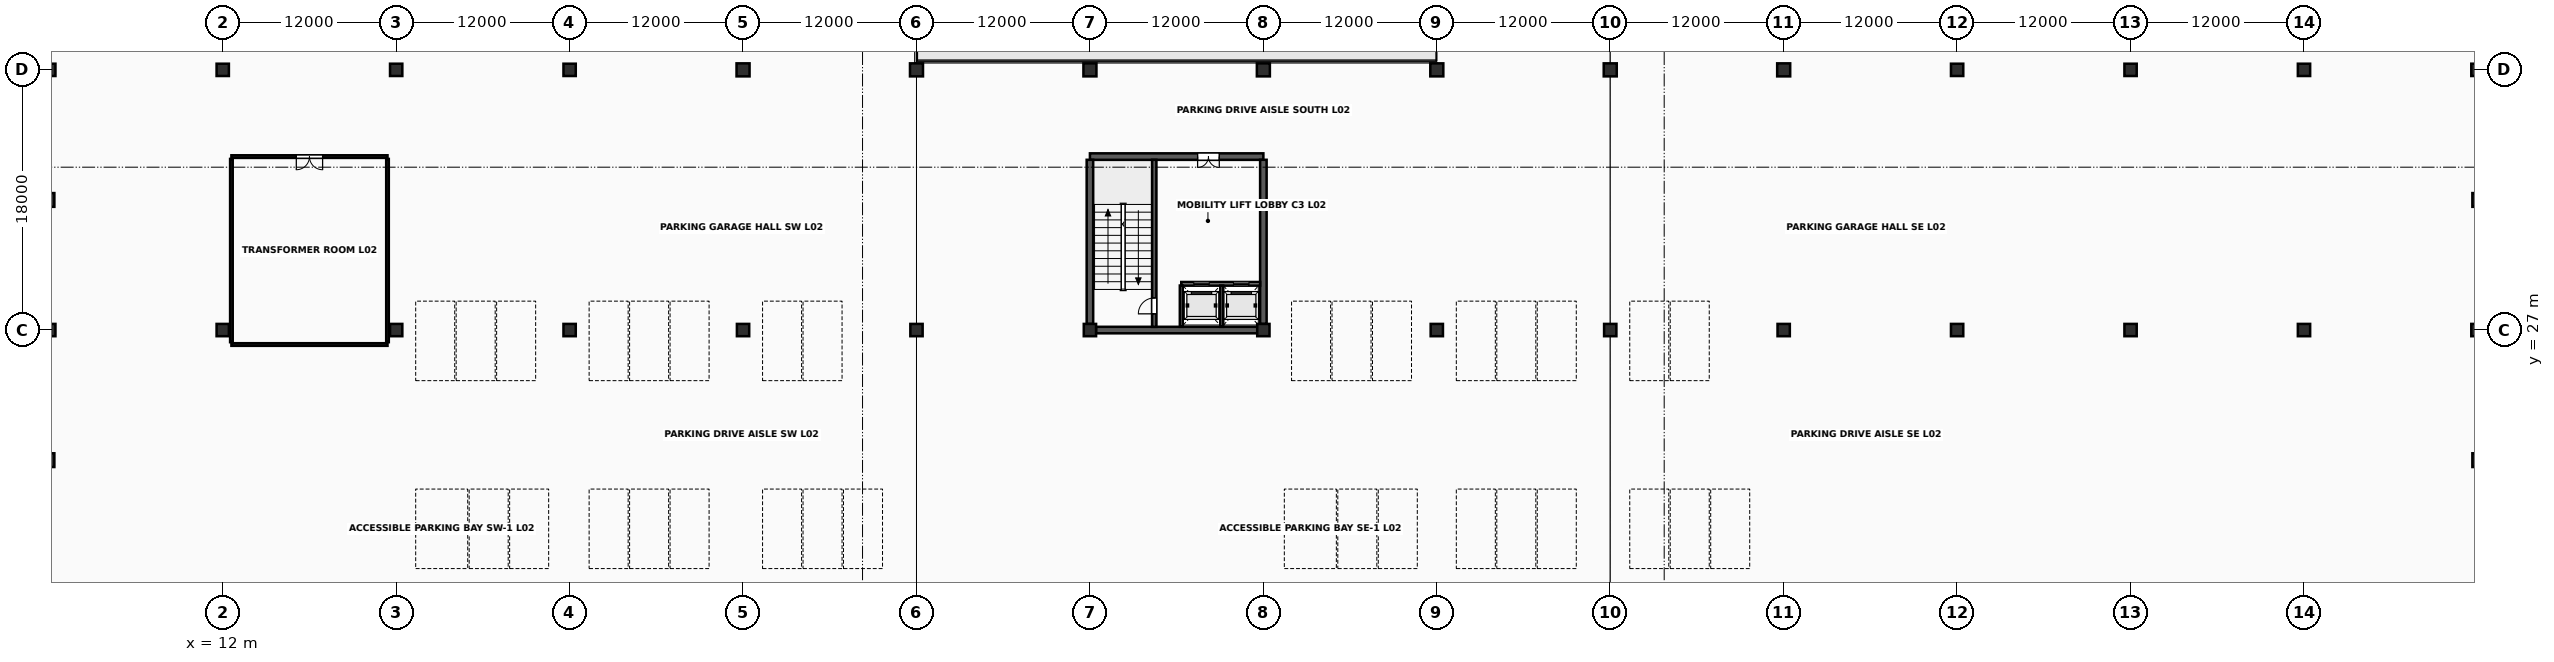
"""IFC4 building model, lengths in metres.
Left out: names, types, materials, properties, quantities, classifications, styles, units other than length and angle.
Written with IfcOpenShell. Run it as: python <this file> out.ifc"""

import sys

from ifc_helpers import new_model, si_unit, direction, frame, frame_2d, origin, origin_2d, place, context, subcontext, project, spatial, rectangle, extrude, element, fill, save


model = new_model("IFC4")
c1 = context("Model", 3, precision=1e-05, world=origin(), true_north=direction((0.0, 1.0)))
c2 = subcontext(c1, "Body", "Model", "MODEL_VIEW")
j1 = project(units=[si_unit("LENGTHUNIT", "METRE"), si_unit("PLANEANGLEUNIT", "RADIAN")], contexts=[c1])
p1 = place(None, origin())
s1 = spatial("IfcSite", under=j1, at=p1, CompositionType="ELEMENT")
p2 = place(p1, origin())
s2 = spatial("IfcBuilding", under=s1, at=p2, CompositionType="ELEMENT")
p3 = place(p2, frame((0.0, 0.0, 9.6)))
s3 = spatial("IfcBuildingStorey", under=s2, at=p3, CompositionType="ELEMENT", Elevation=9.6)
for number, where, z_axis, x_axis in (
    (1, (0.0, 27.0, 0.0), (0.0, 0.0, 1.0), (1.0, 0.0, 0.0)),
    (2, (0.0, 45.0, 0.0), (0.0, 0.0, 1.0), (1.0, 0.0, 0.0)),
    (3, (12.0, 27.0, 0.0), (0.0, 0.0, 1.0), (1.0, 0.0, 0.0)),
    (4, (12.0, 45.0, 0.0), (0.0, 0.0, 1.0), (1.0, 0.0, 0.0)),
    (5, (24.0, 27.0, 0.0), (0.0, 0.0, 1.0), (1.0, 0.0, 0.0)),
    (6, (24.0, 45.0, 0.0), (0.0, 0.0, 1.0), (1.0, 0.0, 0.0)),
    (7, (36.0, 27.0, 0.0), (0.0, 0.0, 1.0), (1.0, 0.0, 0.0)),
    (8, (36.0, 45.0, 0.0), (0.0, 0.0, 1.0), (1.0, 0.0, 0.0)),
    (9, (48.0, 27.0, 0.0), (0.0, 0.0, 1.0), (1.0, 0.0, 0.0)),
):
    element("IfcColumn", number, at=place(p3, frame(where, z_axis=z_axis, x_axis=x_axis)), inside=s3, PredefinedType="COLUMN", context=c2, shape_type="SweptSolid", body=[
        extrude(rectangle(XDim=0.85, YDim=0.85, at=origin_2d()), origin(), (0.0, 0.0, 1.0), 3.8),
    ])
p4 = place(p3, frame((48.0, 45.0, 0.0), z_axis=(0.0, 0.0, 1.0), x_axis=(1.0, 0.0, 0.0)))
e10 = element("IfcColumn", 10, at=p4, inside=s3, PredefinedType="COLUMN", context=c2, shape_type="SweptSolid", body=[
    extrude(rectangle(XDim=0.9, YDim=0.9, at=origin_2d()), origin(), (0.0, 0.0, 1.0), 3.8),
])
p5 = place(p3, frame((60.0, 27.0, 0.0), z_axis=(0.0, 0.0, 1.0), x_axis=(1.0, 0.0, 0.0)))
e11 = element("IfcColumn", 11, at=p5, inside=s3, PredefinedType="COLUMN", context=c2, shape_type="SweptSolid", body=[
    extrude(rectangle(XDim=0.85, YDim=0.85, at=origin_2d()), origin(), (0.0, 0.0, 1.0), 3.8),
])
p6 = place(p3, frame((60.0, 45.0, 0.0), z_axis=(0.0, 0.0, 1.0), x_axis=(1.0, 0.0, 0.0)))
e12 = element("IfcColumn", 12, at=p6, inside=s3, PredefinedType="COLUMN", context=c2, shape_type="SweptSolid", body=[
    extrude(rectangle(XDim=0.9, YDim=0.9, at=origin_2d()), origin(), (0.0, 0.0, 1.0), 3.8),
])
p7 = place(p3, frame((72.0, 27.0, 0.0), z_axis=(0.0, 0.0, 1.0), x_axis=(1.0, 0.0, 0.0)))
e13 = element("IfcColumn", 13, at=p7, inside=s3, PredefinedType="COLUMN", context=c2, shape_type="SweptSolid", body=[
    extrude(rectangle(XDim=0.85, YDim=0.85, at=origin_2d()), origin(), (0.0, 0.0, 1.0), 3.8),
])
p8 = place(p3, frame((72.0, 45.0, 0.0), z_axis=(0.0, 0.0, 1.0), x_axis=(1.0, 0.0, 0.0)))
e14 = element("IfcColumn", 14, at=p8, inside=s3, PredefinedType="COLUMN", context=c2, shape_type="SweptSolid", body=[
    extrude(rectangle(XDim=0.9, YDim=0.9, at=origin_2d()), origin(), (0.0, 0.0, 1.0), 3.8),
])
p9 = place(p3, frame((84.0, 27.0, 0.0), z_axis=(0.0, 0.0, 1.0), x_axis=(1.0, 0.0, 0.0)))
e15 = element("IfcColumn", 15, at=p9, inside=s3, PredefinedType="COLUMN", context=c2, shape_type="SweptSolid", body=[
    extrude(rectangle(XDim=0.85, YDim=0.85, at=origin_2d()), origin(), (0.0, 0.0, 1.0), 3.8),
])
p10 = place(p3, frame((84.0, 45.0, 0.0), z_axis=(0.0, 0.0, 1.0), x_axis=(1.0, 0.0, 0.0)))
e16 = element("IfcColumn", 16, at=p10, inside=s3, PredefinedType="COLUMN", context=c2, shape_type="SweptSolid", body=[
    extrude(rectangle(XDim=0.9, YDim=0.9, at=origin_2d()), origin(), (0.0, 0.0, 1.0), 3.8),
])
p11 = place(p3, frame((96.0, 27.0, 0.0), z_axis=(0.0, 0.0, 1.0), x_axis=(1.0, 0.0, 0.0)))
e17 = element("IfcColumn", 17, at=p11, inside=s3, PredefinedType="COLUMN", context=c2, shape_type="SweptSolid", body=[
    extrude(rectangle(XDim=0.85, YDim=0.85, at=origin_2d()), origin(), (0.0, 0.0, 1.0), 3.8),
])
p12 = place(p3, frame((96.0, 45.0, 0.0), z_axis=(0.0, 0.0, 1.0), x_axis=(1.0, 0.0, 0.0)))
e18 = element("IfcColumn", 18, at=p12, inside=s3, PredefinedType="COLUMN", context=c2, shape_type="SweptSolid", body=[
    extrude(rectangle(XDim=0.9, YDim=0.9, at=origin_2d()), origin(), (0.0, 0.0, 1.0), 3.8),
])
p13 = place(p3, frame((108.0, 27.0, 0.0), z_axis=(0.0, 0.0, 1.0), x_axis=(1.0, 0.0, 0.0)))
e19 = element("IfcColumn", 19, at=p13, inside=s3, PredefinedType="COLUMN", context=c2, shape_type="SweptSolid", body=[
    extrude(rectangle(XDim=0.85, YDim=0.85, at=origin_2d()), origin(), (0.0, 0.0, 1.0), 3.8),
])
p14 = place(p3, frame((108.0, 45.0, 0.0), z_axis=(0.0, 0.0, 1.0), x_axis=(1.0, 0.0, 0.0)))
e20 = element("IfcColumn", 20, at=p14, inside=s3, PredefinedType="COLUMN", context=c2, shape_type="SweptSolid", body=[
    extrude(rectangle(XDim=0.9, YDim=0.9, at=origin_2d()), origin(), (0.0, 0.0, 1.0), 3.8),
])
p15 = place(p3, frame((120.0, 27.0, 0.0), z_axis=(0.0, 0.0, 1.0), x_axis=(1.0, 0.0, 0.0)))
e21 = element("IfcColumn", 21, at=p15, inside=s3, PredefinedType="COLUMN", context=c2, shape_type="SweptSolid", body=[
    extrude(rectangle(XDim=0.85, YDim=0.85, at=origin_2d()), origin(), (0.0, 0.0, 1.0), 3.8),
])
p16 = place(p3, frame((120.0, 45.0, 0.0), z_axis=(0.0, 0.0, 1.0), x_axis=(1.0, 0.0, 0.0)))
e22 = element("IfcColumn", 22, at=p16, inside=s3, PredefinedType="COLUMN", context=c2, shape_type="SweptSolid", body=[
    extrude(rectangle(XDim=0.9, YDim=0.9, at=origin_2d()), origin(), (0.0, 0.0, 1.0), 3.8),
])
for number, where, z_axis, x_axis in (
    (23, (132.0, 27.0, 0.0), (0.0, 0.0, 1.0), (1.0, 0.0, 0.0)),
    (24, (132.0, 45.0, 0.0), (0.0, 0.0, 1.0), (1.0, 0.0, 0.0)),
    (25, (144.0, 27.0, 0.0), (0.0, 0.0, 1.0), (1.0, 0.0, 0.0)),
    (26, (144.0, 45.0, 0.0), (0.0, 0.0, 1.0), (1.0, 0.0, 0.0)),
    (27, (156.0, 27.0, 0.0), (0.0, 0.0, 1.0), (1.0, 0.0, 0.0)),
    (28, (156.0, 45.0, 0.0), (0.0, 0.0, 1.0), (1.0, 0.0, 0.0)),
    (29, (168.0, 27.0, 0.0), (0.0, 0.0, 1.0), (1.0, 0.0, 0.0)),
    (30, (168.0, 45.0, 0.0), (0.0, 0.0, 1.0), (1.0, 0.0, 0.0)),
):
    element("IfcColumn", number, at=place(p3, frame(where, z_axis=z_axis, x_axis=x_axis)), inside=s3, PredefinedType="COLUMN", context=c2, shape_type="SweptSolid", body=[
        extrude(rectangle(XDim=0.85, YDim=0.85, at=origin_2d()), origin(), (0.0, 0.0, 1.0), 3.8),
    ])
for number, where, z_axis, x_axis in (
    (31, (0.0, 18.0, 0.0), (0.0, 0.0, 1.0), (1.0, 0.0, 0.0)),
    (32, (0.0, 36.0, 0.0), (0.0, 0.0, 1.0), (1.0, 0.0, 0.0)),
    (33, (168.0, 18.0, 0.0), (0.0, 0.0, 1.0), (1.0, 0.0, 0.0)),
    (34, (168.0, 36.0, 0.0), (0.0, 0.0, 1.0), (1.0, 0.0, 0.0)),
):
    element("IfcColumn", number, at=place(p3, frame(where, z_axis=z_axis, x_axis=x_axis)), inside=s3, PredefinedType="PILASTER", context=c2, shape_type="SweptSolid", body=[
        extrude(rectangle(XDim=0.7, YDim=0.95, at=origin_2d()), origin(), (0.0, 0.0, 1.0), 3.8),
    ])
p17 = place(p3, frame((72.422, 27.0, 0.0), z_axis=(0.0, 0.0, 1.0), x_axis=(1.0, 0.0, 0.0)))
e35 = element("IfcWall", 35, at=p17, inside=s3, PredefinedType="SHEAR", context=c2, shape_type="SweptSolid", body=[
    extrude(rectangle(XDim=11.156, YDim=0.45, at=frame_2d((5.578, 0.0))), origin(), (0.0, 0.0, 1.0), 3.638),
])
p18 = place(p3, frame((72.0, 39.0, 0.0), z_axis=(0.0, 0.0, 1.0), x_axis=(1.0, 0.0, 0.0)))
e36 = element("IfcWall", 36, at=p18, inside=s3, PredefinedType="SHEAR", context=c2, shape_type="SweptSolid", body=[
    extrude(rectangle(XDim=12.0, YDim=0.45, at=frame_2d((6.0, 0.0))), origin(), (0.0, 0.0, 1.0), 3.638),
])
p19 = place(p18, frame((7.45, 0.0, 0.0)))
e37 = element("IfcOpeningElement", 37, at=p19, cuts=e36, PredefinedType="OPENING", context=c2, shape_type="SweptSolid", body=[
    extrude(rectangle(XDim=1.5, YDim=2.25, at=frame_2d((0.75, 1.125))), frame((0.0, 0.24, 0.0), z_axis=(0.0, -1.0, 0.0), x_axis=(1.0, 0.0, 0.0)), (0.0, 0.0, 1.0), 0.48),
])
for number, where, z_axis, x_axis in (
    (38, (72.0, 27.422, 0.0), (0.0, 0.0, 1.0), (0.0, 1.0, 0.0)),
    (39, (84.0, 27.422, 0.0), (0.0, 0.0, 1.0), (0.0, 1.0, 0.0)),
):
    element("IfcWall", number, at=place(p3, frame(where, z_axis=z_axis, x_axis=x_axis)), inside=s3, PredefinedType="SHEAR", context=c2, shape_type="SweptSolid", body=[
        extrude(rectangle(XDim=11.356, YDim=0.45, at=frame_2d((5.678, 0.0))), origin(), (0.0, 0.0, 1.0), 3.638),
    ])
p20 = place(p3, frame((76.45, 27.222, 0.0), z_axis=(0.0, 0.0, 1.0), x_axis=(0.0, 1.0, 0.0)))
e40 = element("IfcWall", 40, at=p20, inside=s3, PredefinedType="SHEAR", context=c2, shape_type="SweptSolid", body=[
    extrude(rectangle(XDim=11.556, YDim=0.3, at=frame_2d((5.778, 0.0))), origin(), (0.0, 0.0, 1.0), 3.638),
])
p21 = place(p20, frame((0.9, 0.0, 0.0)))
e41 = element("IfcOpeningElement", 41, at=p21, cuts=e40, PredefinedType="OPENING", context=c2, shape_type="SweptSolid", body=[
    extrude(rectangle(XDim=1.1, YDim=2.2, at=frame_2d((0.55, 1.1))), frame((0.0, 0.165, 0.0), z_axis=(0.0, -1.0, 0.0), x_axis=(1.0, 0.0, 0.0)), (0.0, 0.0, 1.0), 0.33),
])
p22 = place(p3, frame((78.32, 30.2, 0.0), z_axis=(0.0, 0.0, 1.0), x_axis=(1.0, 0.0, 0.0)))
e42 = element("IfcWall", 42, at=p22, inside=s3, PredefinedType="SOLIDWALL", context=c2, shape_type="SweptSolid", body=[
    extrude(rectangle(XDim=5.458, YDim=0.25, at=frame_2d((2.729, 0.0))), origin(), (0.0, 0.0, 1.0), 3.638),
])
p23 = place(p22, frame((0.86, 0.0, 0.0)))
e43 = element("IfcOpeningElement", 43, at=p23, cuts=e42, PredefinedType="OPENING", context=c2, shape_type="SweptSolid", body=[
    extrude(rectangle(XDim=1.08, YDim=2.22, at=frame_2d((0.54, 1.11))), frame((0.0, 0.14, 0.0), z_axis=(0.0, -1.0, 0.0), x_axis=(1.0, 0.0, 0.0)), (0.0, 0.0, 1.0), 0.28),
])
p24 = place(p22, frame((3.61, 0.0, 0.0)))
e44 = element("IfcOpeningElement", 44, at=p24, cuts=e42, PredefinedType="OPENING", context=c2, shape_type="SweptSolid", body=[
    extrude(rectangle(XDim=1.08, YDim=2.22, at=frame_2d((0.54, 1.11))), frame((0.0, 0.14, 0.0), z_axis=(0.0, -1.0, 0.0), x_axis=(1.0, 0.0, 0.0)), (0.0, 0.0, 1.0), 0.28),
])
for number, where, z_axis, x_axis in (
    (45, (78.32, 27.225, 0.0), (0.0, 0.0, 1.0), (0.0, 1.0, 0.0)),
    (46, (81.12, 27.225, 0.0), (0.0, 0.0, 1.0), (0.0, 1.0, 0.0)),
):
    element("IfcWall", number, at=place(p3, frame(where, z_axis=z_axis, x_axis=x_axis)), inside=s3, PredefinedType="SOLIDWALL", context=c2, shape_type="SweptSolid", body=[
        extrude(rectangle(XDim=2.855, YDim=0.2, at=frame_2d((1.427, 0.0))), origin(), (0.0, 0.0, 1.0), 3.628),
    ])
p25 = place(p3, frame((12.6, 26.0, 0.0), z_axis=(0.0, 0.0, 1.0), x_axis=(1.0, 0.0, 0.0)))
e47 = element("IfcWall", 47, at=p25, inside=s3, PredefinedType="SOLIDWALL", context=c2, shape_type="SweptSolid", body=[
    extrude(rectangle(XDim=10.8, YDim=0.18, at=frame_2d((5.4, 0.0))), origin(), (0.0, 0.0, 1.0), 2.75),
])
p26 = place(p3, frame((12.6, 39.0, 0.0), z_axis=(0.0, 0.0, 1.0), x_axis=(1.0, 0.0, 0.0)))
e48 = element("IfcWall", 48, at=p26, inside=s3, PredefinedType="SOLIDWALL", context=c2, shape_type="SweptSolid", body=[
    extrude(rectangle(XDim=10.8, YDim=0.18, at=frame_2d((5.4, 0.0))), origin(), (0.0, 0.0, 1.0), 2.75),
])
p27 = place(p26, frame((4.49, 0.0, 0.0)))
e49 = element("IfcOpeningElement", 49, at=p27, cuts=e48, PredefinedType="OPENING", context=c2, shape_type="SweptSolid", body=[
    extrude(rectangle(XDim=1.82, YDim=2.36, at=frame_2d((0.91, 1.18))), frame((0.0, 0.105, 0.0), z_axis=(0.0, -1.0, 0.0), x_axis=(1.0, 0.0, 0.0)), (0.0, 0.0, 1.0), 0.21),
])
for number, where, z_axis, x_axis in (
    (50, (12.6, 26.16, 0.0), (0.0, 0.0, 1.0), (0.0, 1.0, 0.0)),
    (51, (23.4, 26.16, 0.0), (0.0, 0.0, 1.0), (0.0, 1.0, 0.0)),
):
    element("IfcWall", number, at=place(p3, frame(where, z_axis=z_axis, x_axis=x_axis)), inside=s3, PredefinedType="SOLIDWALL", context=c2, shape_type="SweptSolid", body=[
        extrude(rectangle(XDim=12.68, YDim=0.18, at=frame_2d((6.34, 0.0))), origin(), (0.0, 0.0, 1.0), 2.75),
    ])
p28 = place(p21, origin())
e52 = element("IfcDoor", 52, at=p28, inside=s3, OperationType="SINGLE_SWING_LEFT", PredefinedType="DOOR", context=c2, shape_type="SweptSolid", body=[
    extrude(rectangle(XDim=1.1, YDim=2.2, at=frame_2d((0.55, 1.1))), frame((0.0, 0.025, 0.0), z_axis=(0.0, -1.0, 0.0), x_axis=(1.0, 0.0, 0.0)), (0.0, 0.0, 1.0), 0.05),
])
fill(e41, e52)
p29 = place(p19, origin())
e53 = element("IfcDoor", 53, at=p29, inside=s3, OperationType="DOUBLE_DOOR_SINGLE_SWING", PredefinedType="DOOR", context=c2, shape_type="SweptSolid", body=[
    extrude(rectangle(XDim=1.5, YDim=2.25, at=frame_2d((0.75, 1.125))), frame((0.0, 0.025, 0.0), z_axis=(0.0, -1.0, 0.0), x_axis=(1.0, 0.0, 0.0)), (0.0, 0.0, 1.0), 0.05),
])
fill(e37, e53)
p30 = place(p23, origin())
e54 = element("IfcDoor", 54, at=p30, inside=s3, OperationType="SLIDING_TO_LEFT", PredefinedType="USERDEFINED", context=c2, shape_type="SweptSolid", body=[
    extrude(rectangle(XDim=1.08, YDim=2.22, at=frame_2d((0.54, 1.11))), frame((0.0, 0.025, 0.0), z_axis=(0.0, -1.0, 0.0), x_axis=(1.0, 0.0, 0.0)), (0.0, 0.0, 1.0), 0.05),
])
fill(e43, e54)
p31 = place(p24, origin())
e55 = element("IfcDoor", 55, at=p31, inside=s3, OperationType="SLIDING_TO_LEFT", PredefinedType="USERDEFINED", context=c2, shape_type="SweptSolid", body=[
    extrude(rectangle(XDim=1.08, YDim=2.22, at=frame_2d((0.54, 1.11))), frame((0.0, 0.025, 0.0), z_axis=(0.0, -1.0, 0.0), x_axis=(1.0, 0.0, 0.0)), (0.0, 0.0, 1.0), 0.05),
])
fill(e44, e55)
p32 = place(p27, origin())
e56 = element("IfcDoor", 56, at=p32, inside=s3, OperationType="DOUBLE_DOOR_SINGLE_SWING", PredefinedType="DOOR", context=c2, shape_type="SweptSolid", body=[
    extrude(rectangle(XDim=1.82, YDim=2.36, at=frame_2d((0.91, 1.18))), frame((0.0, 0.025, 0.0), z_axis=(0.0, -1.0, 0.0), x_axis=(1.0, 0.0, 0.0)), (0.0, 0.0, 1.0), 0.05),
])
fill(e49, e56)
save(model, sys.argv[1])
